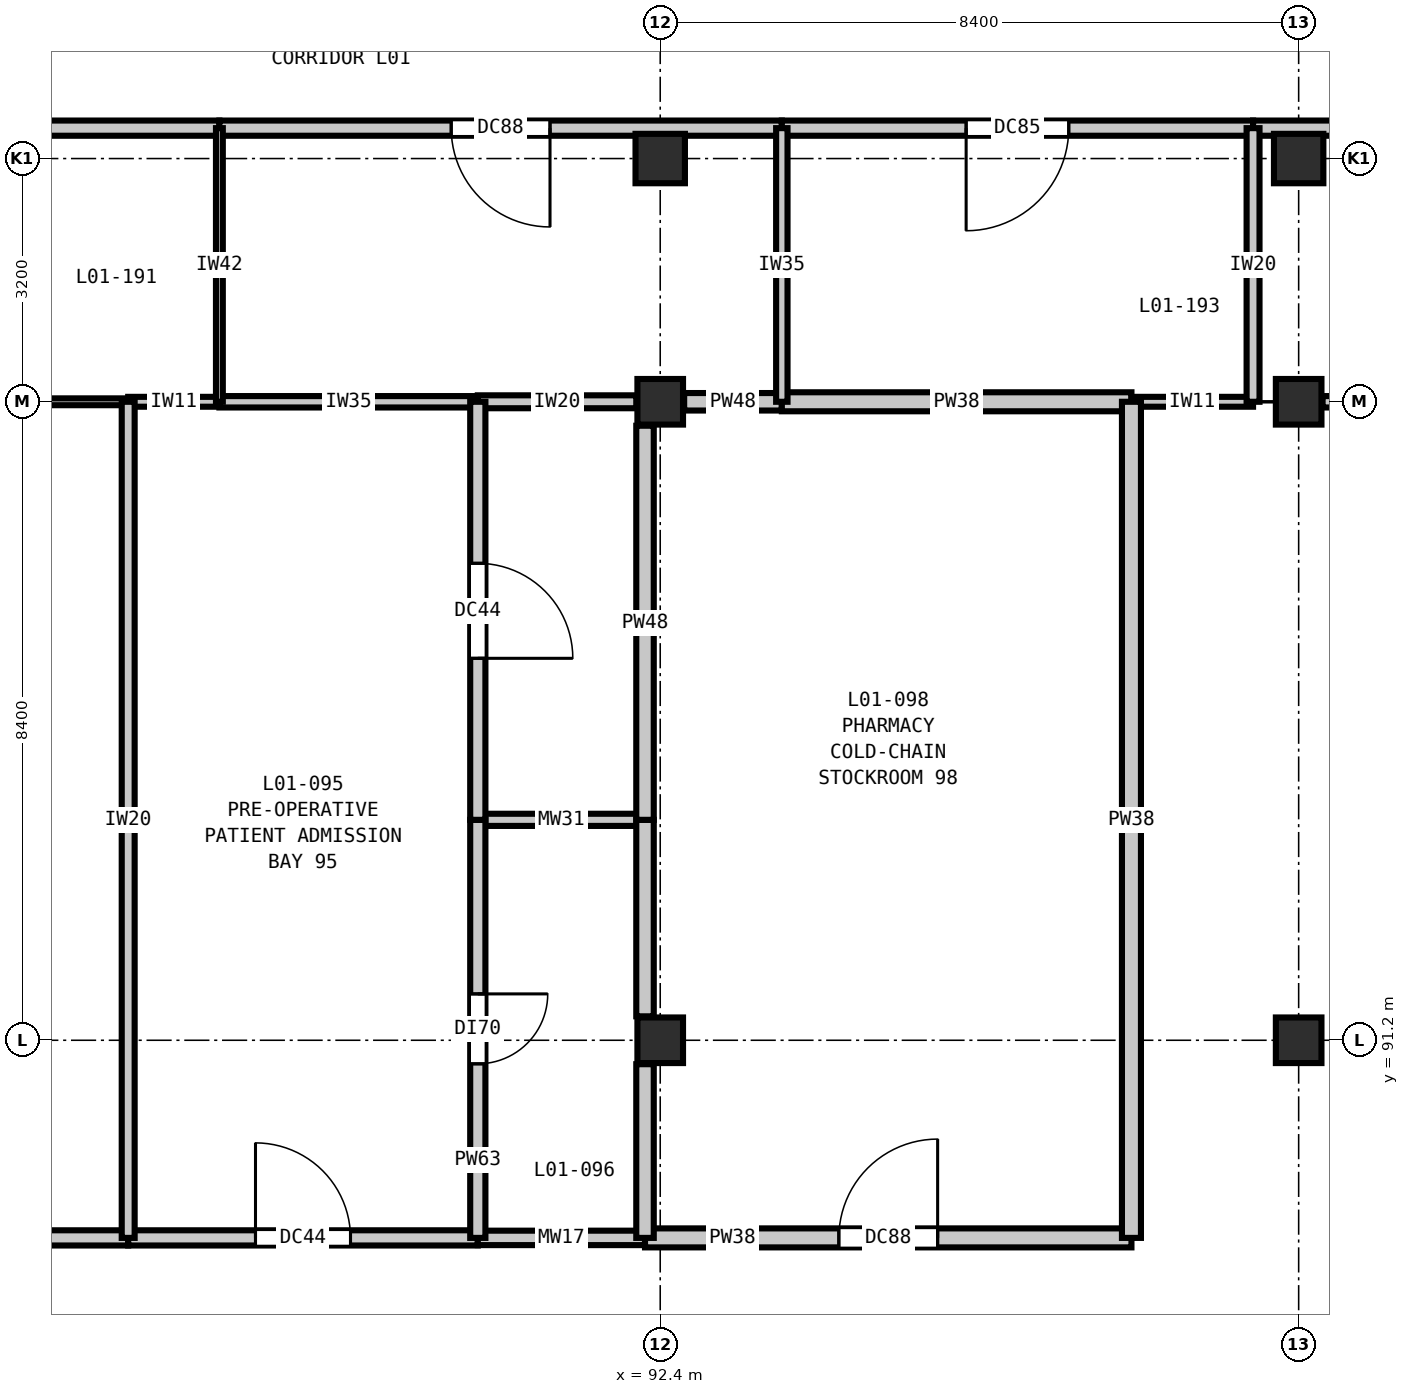
"""IFC4 building model, lengths in metres.
Left out: names, types, materials, properties, quantities, classifications, styles, units other than length and angle.
Written with IfcOpenShell. Run it as: python <this file> out.ifc"""

import sys

from ifc_helpers import new_model, si_unit, direction, frame, frame_2d, origin, origin_2d, place, context, subcontext, project, spatial, rectangle, extrude, element, fill, save


model = new_model("IFC4")
c1 = context("Model", 3, precision=1e-05, world=origin(), true_north=direction((0.0, 1.0)))
c2 = subcontext(c1, "Body", "Model", "MODEL_VIEW")
j1 = project(units=[si_unit("LENGTHUNIT", "METRE"), si_unit("PLANEANGLEUNIT", "RADIAN")], contexts=[c1])
p1 = place(None, origin())
s1 = spatial("IfcSite", under=j1, at=p1, CompositionType="ELEMENT")
p2 = place(p1, origin())
s2 = spatial("IfcBuilding", under=s1, at=p2, CompositionType="ELEMENT")
p3 = place(p2, frame((0.0, 0.0, 5.4)))
s3 = spatial("IfcBuildingStorey", under=s2, at=p3, CompositionType="ELEMENT", Elevation=5.4)
for number, where, z_axis, x_axis in (
    (1, (92.4, 91.2, 0.0), (0.0, 0.0, 1.0), (1.0, 0.0, 0.0)),
    (2, (92.4, 99.6, 0.0), (0.0, 0.0, 1.0), (1.0, 0.0, 0.0)),
):
    element("IfcColumn", number, at=place(p3, frame(where, z_axis=z_axis, x_axis=x_axis)), inside=s3, PredefinedType="COLUMN", context=c2, shape_type="SweptSolid", body=[
        extrude(rectangle(XDim=0.6, YDim=0.6, at=origin_2d()), origin(), (0.0, 0.0, 1.0), 5.4),
    ])
p4 = place(p3, frame((92.4, 102.8, 0.0), z_axis=(0.0, 0.0, 1.0), x_axis=(1.0, 0.0, 0.0)))
e3 = element("IfcColumn", 3, at=p4, inside=s3, PredefinedType="COLUMN", context=c2, shape_type="SweptSolid", body=[
    extrude(rectangle(XDim=0.65, YDim=0.65, at=origin_2d()), origin(), (0.0, 0.0, 1.0), 5.4),
])
for number, where, z_axis, x_axis in (
    (4, (100.8, 91.2, 0.0), (0.0, 0.0, 1.0), (1.0, 0.0, 0.0)),
    (5, (100.8, 99.6, 0.0), (0.0, 0.0, 1.0), (1.0, 0.0, 0.0)),
):
    element("IfcColumn", number, at=place(p3, frame(where, z_axis=z_axis, x_axis=x_axis)), inside=s3, PredefinedType="COLUMN", context=c2, shape_type="SweptSolid", body=[
        extrude(rectangle(XDim=0.6, YDim=0.6, at=origin_2d()), origin(), (0.0, 0.0, 1.0), 5.4),
    ])
p5 = place(p3, frame((100.8, 102.8, 0.0), z_axis=(0.0, 0.0, 1.0), x_axis=(1.0, 0.0, 0.0)))
e6 = element("IfcColumn", 6, at=p5, inside=s3, PredefinedType="COLUMN", context=c2, shape_type="SweptSolid", body=[
    extrude(rectangle(XDim=0.65, YDim=0.65, at=origin_2d()), origin(), (0.0, 0.0, 1.0), 5.4),
])
p6 = place(p3, frame((75.6, 88.6, 0.0), z_axis=(0.0, 0.0, 1.0), x_axis=(1.0, 0.0, 0.0)))
e7 = element("IfcWall", 7, at=p6, inside=s3, PredefinedType="PARTITIONING", context=c2, shape_type="SweptSolid", body=[
    extrude(rectangle(XDim=9.8, YDim=0.2, at=frame_2d((4.9, 0.0))), origin(), (0.0, 0.0, 1.0), 5.05),
])
p7 = place(p6, frame((3.975, 0.0, 0.0)))
e8 = element("IfcOpeningElement", 8, at=p7, cuts=e7, PredefinedType="OPENING", context=c2, shape_type="SweptSolid", body=[
    extrude(rectangle(XDim=1.85, YDim=2.3, at=frame_2d((0.925, 1.15))), frame((0.0, 0.11, 0.0), z_axis=(0.0, -1.0, 0.0), x_axis=(1.0, 0.0, 0.0)), (0.0, 0.0, 1.0), 0.22),
])
p8 = place(p3, frame((85.4, 88.6, 0.0), z_axis=(0.0, 0.0, 1.0), x_axis=(1.0, 0.0, 0.0)))
e9 = element("IfcWall", 9, at=p8, inside=s3, PredefinedType="PARTITIONING", context=c2, shape_type="SweptSolid", body=[
    extrude(rectangle(XDim=4.6, YDim=0.2, at=frame_2d((2.3, 0.0))), origin(), (0.0, 0.0, 1.0), 5.05),
])
p9 = place(p8, frame((1.675, 0.0, 0.0)))
e10 = element("IfcOpeningElement", 10, at=p9, cuts=e9, PredefinedType="OPENING", context=c2, shape_type="SweptSolid", body=[
    extrude(rectangle(XDim=1.25, YDim=2.15, at=frame_2d((0.625, 1.075))), frame((0.0, 0.11, 0.0), z_axis=(0.0, -1.0, 0.0), x_axis=(1.0, 0.0, 0.0)), (0.0, 0.0, 1.0), 0.22),
])
p10 = place(p3, frame((90.0, 88.6, 0.0), z_axis=(0.0, 0.0, 1.0), x_axis=(1.0, 0.0, 0.0)))
e11 = element("IfcWall", 11, at=p10, inside=s3, PredefinedType="PLUMBINGWALL", context=c2, shape_type="SweptSolid", body=[
    extrude(rectangle(XDim=2.2, YDim=0.19, at=frame_2d((1.1, 0.0))), origin(), (0.0, 0.0, 1.0), 5.05),
])
p11 = place(p3, frame((92.2, 88.6, 0.0), z_axis=(0.0, 0.0, 1.0), x_axis=(1.0, 0.0, 0.0)))
e12 = element("IfcWall", 12, at=p11, inside=s3, PredefinedType="PARTITIONING", context=c2, shape_type="SweptSolid", body=[
    extrude(rectangle(XDim=6.4, YDim=0.25, at=frame_2d((3.2, 0.0))), origin(), (0.0, 0.0, 1.0), 5.05),
])
p12 = place(p11, frame((2.55, 0.0, 0.0)))
e13 = element("IfcOpeningElement", 13, at=p12, cuts=e12, PredefinedType="OPENING", context=c2, shape_type="SweptSolid", body=[
    extrude(rectangle(XDim=1.3, YDim=2.2, at=frame_2d((0.65, 1.1))), frame((0.0, 0.135, 0.0), z_axis=(0.0, -1.0, 0.0), x_axis=(1.0, 0.0, 0.0)), (0.0, 0.0, 1.0), 0.27),
])
p13 = place(p3, frame((90.0, 94.1, 0.0), z_axis=(0.0, 0.0, 1.0), x_axis=(1.0, 0.0, 0.0)))
e14 = element("IfcWall", 14, at=p13, inside=s3, PredefinedType="PLUMBINGWALL", context=c2, shape_type="SweptSolid", body=[
    extrude(rectangle(XDim=2.2, YDim=0.16, at=frame_2d((1.1, 0.0))), origin(), (0.0, 0.0, 1.0), 5.05),
])
p14 = place(p3, frame((84.315, 99.6, 0.0), z_axis=(0.0, 0.0, 1.0), x_axis=(1.0, 0.0, 0.0)))
e15 = element("IfcWall", 15, at=p14, inside=s3, PredefinedType="PARTITIONING", context=c2, shape_type="SweptSolid", body=[
    extrude(rectangle(XDim=1.085, YDim=0.09, at=frame_2d((0.542, 0.0))), origin(), (0.0, 0.0, 1.0), 4.685),
])
p15 = place(p3, frame((85.4, 99.6, 0.0), z_axis=(0.0, 0.0, 1.0), x_axis=(1.0, 0.0, 0.0)))
e16 = element("IfcWall", 16, at=p15, inside=s3, PredefinedType="PARTITIONING", context=c2, shape_type="SweptSolid", body=[
    extrude(rectangle(XDim=1.2, YDim=0.13, at=frame_2d((0.6, 0.0))), origin(), (0.0, 0.0, 1.0), 4.685),
])
p16 = place(p3, frame((86.6, 99.6, 0.0), z_axis=(0.0, 0.0, 1.0), x_axis=(1.0, 0.0, 0.0)))
e17 = element("IfcWall", 17, at=p16, inside=s3, PredefinedType="PARTITIONING", context=c2, shape_type="SweptSolid", body=[
    extrude(rectangle(XDim=3.4, YDim=0.15, at=frame_2d((1.7, 0.0))), origin(), (0.0, 0.0, 1.0), 4.685),
])
p17 = place(p3, frame((90.0, 99.6, 0.0), z_axis=(0.0, 0.0, 1.0), x_axis=(1.0, 0.0, 0.0)))
e18 = element("IfcWall", 18, at=p17, inside=s3, PredefinedType="PARTITIONING", context=c2, shape_type="SweptSolid", body=[
    extrude(rectangle(XDim=2.085, YDim=0.17, at=frame_2d((1.042, 0.0))), origin(), (0.0, 0.0, 1.0), 4.685),
])
p18 = place(p3, frame((92.715, 99.6, 0.0), z_axis=(0.0, 0.0, 1.0), x_axis=(1.0, 0.0, 0.0)))
e19 = element("IfcWall", 19, at=p18, inside=s3, PredefinedType="PARTITIONING", context=c2, shape_type="SweptSolid", body=[
    extrude(rectangle(XDim=1.285, YDim=0.23, at=frame_2d((0.643, 0.0))), origin(), (0.0, 0.0, 1.0), 4.685),
])
p19 = place(p3, frame((94.0, 99.6, 0.0), z_axis=(0.0, 0.0, 1.0), x_axis=(1.0, 0.0, 0.0)))
e20 = element("IfcWall", 20, at=p19, inside=s3, PredefinedType="PARTITIONING", context=c2, shape_type="SweptSolid", body=[
    extrude(rectangle(XDim=4.6, YDim=0.25, at=frame_2d((2.3, 0.0))), origin(), (0.0, 0.0, 1.0), 4.685),
])
p20 = place(p3, frame((98.6, 99.6, 0.0), z_axis=(0.0, 0.0, 1.0), x_axis=(1.0, 0.0, 0.0)))
e21 = element("IfcWall", 21, at=p20, inside=s3, PredefinedType="PARTITIONING", context=c2, shape_type="SweptSolid", body=[
    extrude(rectangle(XDim=1.6, YDim=0.13, at=frame_2d((0.8, 0.0))), origin(), (0.0, 0.0, 1.0), 4.685),
])
p21 = place(p3, frame((101.115, 99.6, 0.0), z_axis=(0.0, 0.0, 1.0), x_axis=(1.0, 0.0, 0.0)))
e22 = element("IfcWall", 22, at=p21, inside=s3, PredefinedType="PARTITIONING", context=c2, shape_type="SweptSolid", body=[
    extrude(rectangle(XDim=7.77, YDim=0.15, at=frame_2d((3.885, 0.0))), origin(), (0.0, 0.0, 1.0), 4.685),
])
p22 = place(p3, frame((80.4, 103.2, 0.0), z_axis=(0.0, 0.0, 1.0), x_axis=(1.0, 0.0, 0.0)))
e23 = element("IfcWall", 23, at=p22, inside=s3, PredefinedType="PARTITIONING", context=c2, shape_type="SweptSolid", body=[
    extrude(rectangle(XDim=6.2, YDim=0.2, at=frame_2d((3.1, 0.0))), origin(), (0.0, 0.0, 1.0), 5.05),
])
p23 = place(p22, frame((1.67, 0.0, 0.0)))
e24 = element("IfcOpeningElement", 24, at=p23, cuts=e23, PredefinedType="OPENING", context=c2, shape_type="SweptSolid", body=[
    extrude(rectangle(XDim=1.25, YDim=2.15, at=frame_2d((0.625, 1.075))), frame((0.0, 0.11, 0.0), z_axis=(0.0, -1.0, 0.0), x_axis=(1.0, 0.0, 0.0)), (0.0, 0.0, 1.0), 0.22),
])
p24 = place(p3, frame((86.6, 103.2, 0.0), z_axis=(0.0, 0.0, 1.0), x_axis=(1.0, 0.0, 0.0)))
e25 = element("IfcWall", 25, at=p24, inside=s3, PredefinedType="PARTITIONING", context=c2, shape_type="SweptSolid", body=[
    extrude(rectangle(XDim=7.4, YDim=0.2, at=frame_2d((3.7, 0.0))), origin(), (0.0, 0.0, 1.0), 5.05),
])
p25 = place(p24, frame((3.05, 0.0, 0.0)))
e26 = element("IfcOpeningElement", 26, at=p25, cuts=e25, PredefinedType="OPENING", context=c2, shape_type="SweptSolid", body=[
    extrude(rectangle(XDim=1.3, YDim=2.2, at=frame_2d((0.65, 1.1))), frame((0.0, 0.11, 0.0), z_axis=(0.0, -1.0, 0.0), x_axis=(1.0, 0.0, 0.0)), (0.0, 0.0, 1.0), 0.22),
])
p26 = place(p3, frame((94.0, 103.2, 0.0), z_axis=(0.0, 0.0, 1.0), x_axis=(1.0, 0.0, 0.0)))
e27 = element("IfcWall", 27, at=p26, inside=s3, PredefinedType="PARTITIONING", context=c2, shape_type="SweptSolid", body=[
    extrude(rectangle(XDim=6.2, YDim=0.2, at=frame_2d((3.1, 0.0))), origin(), (0.0, 0.0, 1.0), 5.05),
])
p27 = place(p26, frame((2.425, 0.0, 0.0)))
e28 = element("IfcOpeningElement", 28, at=p27, cuts=e27, PredefinedType="OPENING", context=c2, shape_type="SweptSolid", body=[
    extrude(rectangle(XDim=1.35, YDim=2.2, at=frame_2d((0.675, 1.1))), frame((0.0, 0.11, 0.0), z_axis=(0.0, -1.0, 0.0), x_axis=(1.0, 0.0, 0.0)), (0.0, 0.0, 1.0), 0.22),
])
p28 = place(p3, frame((100.2, 103.2, 0.0), z_axis=(0.0, 0.0, 1.0), x_axis=(1.0, 0.0, 0.0)))
e29 = element("IfcWall", 29, at=p28, inside=s3, PredefinedType="PARTITIONING", context=c2, shape_type="SweptSolid", body=[
    extrude(rectangle(XDim=9.4, YDim=0.2, at=frame_2d((4.7, 0.0))), origin(), (0.0, 0.0, 1.0), 5.05),
])
p29 = place(p28, frame((3.975, 0.0, 0.0)))
e30 = element("IfcOpeningElement", 30, at=p29, cuts=e29, PredefinedType="OPENING", context=c2, shape_type="SweptSolid", body=[
    extrude(rectangle(XDim=1.45, YDim=2.25, at=frame_2d((0.725, 1.125))), frame((0.0, 0.11, 0.0), z_axis=(0.0, -1.0, 0.0), x_axis=(1.0, 0.0, 0.0)), (0.0, 0.0, 1.0), 0.22),
])
p30 = place(p3, frame((85.4, 88.6, 0.0), z_axis=(0.0, 0.0, 1.0), x_axis=(0.0, 1.0, 0.0)))
e31 = element("IfcWall", 31, at=p30, inside=s3, PredefinedType="PARTITIONING", context=c2, shape_type="SweptSolid", body=[
    extrude(rectangle(XDim=11.0, YDim=0.17, at=frame_2d((5.5, 0.0))), origin(), (0.0, 0.0, 1.0), 5.05),
])
p31 = place(p3, frame((86.6, 99.6, 0.0), z_axis=(0.0, 0.0, 1.0), x_axis=(0.0, 1.0, 0.0)))
e32 = element("IfcWall", 32, at=p31, inside=s3, PredefinedType="PARTITIONING", context=c2, shape_type="SweptSolid", body=[
    extrude(rectangle(XDim=3.6, YDim=0.09, at=frame_2d((1.8, 0.0))), origin(), (0.0, 0.0, 1.0), 5.05),
])
p32 = place(p3, frame((90.0, 88.6, 0.0), z_axis=(0.0, 0.0, 1.0), x_axis=(0.0, 1.0, 0.0)))
e33 = element("IfcWall", 33, at=p32, inside=s3, PredefinedType="PARTITIONING", context=c2, shape_type="SweptSolid", body=[
    extrude(rectangle(XDim=5.5, YDim=0.2, at=frame_2d((2.75, 0.0))), origin(), (0.0, 0.0, 1.0), 5.05),
])
p33 = place(p32, frame((2.29, 0.0, 0.0)))
e34 = element("IfcOpeningElement", 34, at=p33, cuts=e33, PredefinedType="OPENING", context=c2, shape_type="SweptSolid", body=[
    extrude(rectangle(XDim=0.92, YDim=2.1, at=frame_2d((0.46, 1.05))), frame((0.0, 0.11, 0.0), z_axis=(0.0, -1.0, 0.0), x_axis=(1.0, 0.0, 0.0)), (0.0, 0.0, 1.0), 0.22),
])
p34 = place(p3, frame((90.0, 94.1, 0.0), z_axis=(0.0, 0.0, 1.0), x_axis=(0.0, 1.0, 0.0)))
e35 = element("IfcWall", 35, at=p34, inside=s3, PredefinedType="PARTITIONING", context=c2, shape_type="SweptSolid", body=[
    extrude(rectangle(XDim=5.5, YDim=0.2, at=frame_2d((2.75, 0.0))), origin(), (0.0, 0.0, 1.0), 5.05),
])
p35 = place(p34, frame((2.125, 0.0, 0.0)))
e36 = element("IfcOpeningElement", 36, at=p35, cuts=e35, PredefinedType="OPENING", context=c2, shape_type="SweptSolid", body=[
    extrude(rectangle(XDim=1.25, YDim=2.15, at=frame_2d((0.625, 1.075))), frame((0.0, 0.11, 0.0), z_axis=(0.0, -1.0, 0.0), x_axis=(1.0, 0.0, 0.0)), (0.0, 0.0, 1.0), 0.22),
])
p36 = place(p3, frame((92.2, 91.515, 0.0), z_axis=(0.0, 0.0, 1.0), x_axis=(0.0, 1.0, 0.0)))
e37 = element("IfcWall", 37, at=p36, inside=s3, PredefinedType="PARTITIONING", context=c2, shape_type="SweptSolid", body=[
    extrude(rectangle(XDim=2.585, YDim=0.23, at=frame_2d((1.292, 0.0))), origin(), (0.0, 0.0, 1.0), 4.735),
])
p37 = place(p3, frame((92.2, 88.6, 0.0), z_axis=(0.0, 0.0, 1.0), x_axis=(0.0, 1.0, 0.0)))
e38 = element("IfcWall", 38, at=p37, inside=s3, PredefinedType="PARTITIONING", context=c2, shape_type="SweptSolid", body=[
    extrude(rectangle(XDim=2.285, YDim=0.23, at=frame_2d((1.143, 0.0))), origin(), (0.0, 0.0, 1.0), 4.735),
])
p38 = place(p3, frame((92.2, 94.1, 0.0), z_axis=(0.0, 0.0, 1.0), x_axis=(0.0, 1.0, 0.0)))
e39 = element("IfcWall", 39, at=p38, inside=s3, PredefinedType="PARTITIONING", context=c2, shape_type="SweptSolid", body=[
    extrude(rectangle(XDim=5.185, YDim=0.23, at=frame_2d((2.592, 0.0))), origin(), (0.0, 0.0, 1.0), 4.735),
])
p39 = place(p3, frame((94.0, 99.6, 0.0), z_axis=(0.0, 0.0, 1.0), x_axis=(0.0, 1.0, 0.0)))
e40 = element("IfcWall", 40, at=p39, inside=s3, PredefinedType="PARTITIONING", context=c2, shape_type="SweptSolid", body=[
    extrude(rectangle(XDim=3.6, YDim=0.15, at=frame_2d((1.8, 0.0))), origin(), (0.0, 0.0, 1.0), 5.05),
])
p40 = place(p3, frame((98.6, 88.6, 0.0), z_axis=(0.0, 0.0, 1.0), x_axis=(0.0, 1.0, 0.0)))
e41 = element("IfcWall", 41, at=p40, inside=s3, PredefinedType="PARTITIONING", context=c2, shape_type="SweptSolid", body=[
    extrude(rectangle(XDim=11.0, YDim=0.25, at=frame_2d((5.5, 0.0))), origin(), (0.0, 0.0, 1.0), 5.05),
])
p41 = place(p3, frame((100.2, 99.6, 0.0), z_axis=(0.0, 0.0, 1.0), x_axis=(0.0, 1.0, 0.0)))
e42 = element("IfcWall", 42, at=p41, inside=s3, PredefinedType="PARTITIONING", context=c2, shape_type="SweptSolid", body=[
    extrude(rectangle(XDim=3.6, YDim=0.17, at=frame_2d((1.8, 0.0))), origin(), (0.0, 0.0, 1.0), 5.05),
])
p42 = place(p9, origin())
e43 = element("IfcDoor", 43, at=p42, inside=s3, OperationType="SINGLE_SWING_LEFT", PredefinedType="DOOR", context=c2, shape_type="SweptSolid", body=[
    extrude(rectangle(XDim=1.25, YDim=2.15, at=frame_2d((0.625, 1.075))), frame((0.0, 0.025, 0.0), z_axis=(0.0, -1.0, 0.0), x_axis=(1.0, 0.0, 0.0)), (0.0, 0.0, 1.0), 0.05),
])
fill(e10, e43)
p43 = place(p12, origin())
e44 = element("IfcDoor", 44, at=p43, inside=s3, OperationType="SINGLE_SWING_RIGHT", PredefinedType="DOOR", context=c2, shape_type="SweptSolid", body=[
    extrude(rectangle(XDim=1.3, YDim=2.2, at=frame_2d((0.65, 1.1))), frame((0.0, 0.025, 0.0), z_axis=(0.0, -1.0, 0.0), x_axis=(1.0, 0.0, 0.0)), (0.0, 0.0, 1.0), 0.05),
])
fill(e13, e44)
p44 = place(p25, frame((1.3, 0.0, 0.0), z_axis=(0.0, 0.0, 1.0), x_axis=(-1.0, 0.0, 0.0)))
e45 = element("IfcDoor", 45, at=p44, inside=s3, OperationType="SINGLE_SWING_LEFT", PredefinedType="DOOR", context=c2, shape_type="SweptSolid", body=[
    extrude(rectangle(XDim=1.3, YDim=2.2, at=frame_2d((0.65, 1.1))), frame((0.0, 0.025, 0.0), z_axis=(0.0, -1.0, 0.0), x_axis=(1.0, 0.0, 0.0)), (0.0, 0.0, 1.0), 0.05),
])
fill(e26, e45)
p45 = place(p27, frame((1.35, 0.0, 0.0), z_axis=(0.0, 0.0, 1.0), x_axis=(-1.0, 0.0, 0.0)))
e46 = element("IfcDoor", 46, at=p45, inside=s3, OperationType="SINGLE_SWING_RIGHT", PredefinedType="DOOR", context=c2, shape_type="SweptSolid", body=[
    extrude(rectangle(XDim=1.35, YDim=2.2, at=frame_2d((0.675, 1.1))), frame((0.0, 0.025, 0.0), z_axis=(0.0, -1.0, 0.0), x_axis=(1.0, 0.0, 0.0)), (0.0, 0.0, 1.0), 0.05),
])
fill(e28, e46)
p46 = place(p33, frame((0.92, 0.0, 0.0), z_axis=(0.0, 0.0, 1.0), x_axis=(-1.0, 0.0, 0.0)))
e47 = element("IfcDoor", 47, at=p46, inside=s3, OperationType="SINGLE_SWING_LEFT", PredefinedType="DOOR", context=c2, shape_type="SweptSolid", body=[
    extrude(rectangle(XDim=0.92, YDim=2.1, at=frame_2d((0.46, 1.05))), frame((0.0, 0.025, 0.0), z_axis=(0.0, -1.0, 0.0), x_axis=(1.0, 0.0, 0.0)), (0.0, 0.0, 1.0), 0.05),
])
fill(e34, e47)
p47 = place(p35, frame((1.25, 0.0, 0.0), z_axis=(0.0, 0.0, 1.0), x_axis=(-1.0, 0.0, 0.0)))
e48 = element("IfcDoor", 48, at=p47, inside=s3, OperationType="SINGLE_SWING_RIGHT", PredefinedType="DOOR", context=c2, shape_type="SweptSolid", body=[
    extrude(rectangle(XDim=1.25, YDim=2.15, at=frame_2d((0.625, 1.075))), frame((0.0, 0.025, 0.0), z_axis=(0.0, -1.0, 0.0), x_axis=(1.0, 0.0, 0.0)), (0.0, 0.0, 1.0), 0.05),
])
fill(e36, e48)
save(model, sys.argv[1])
